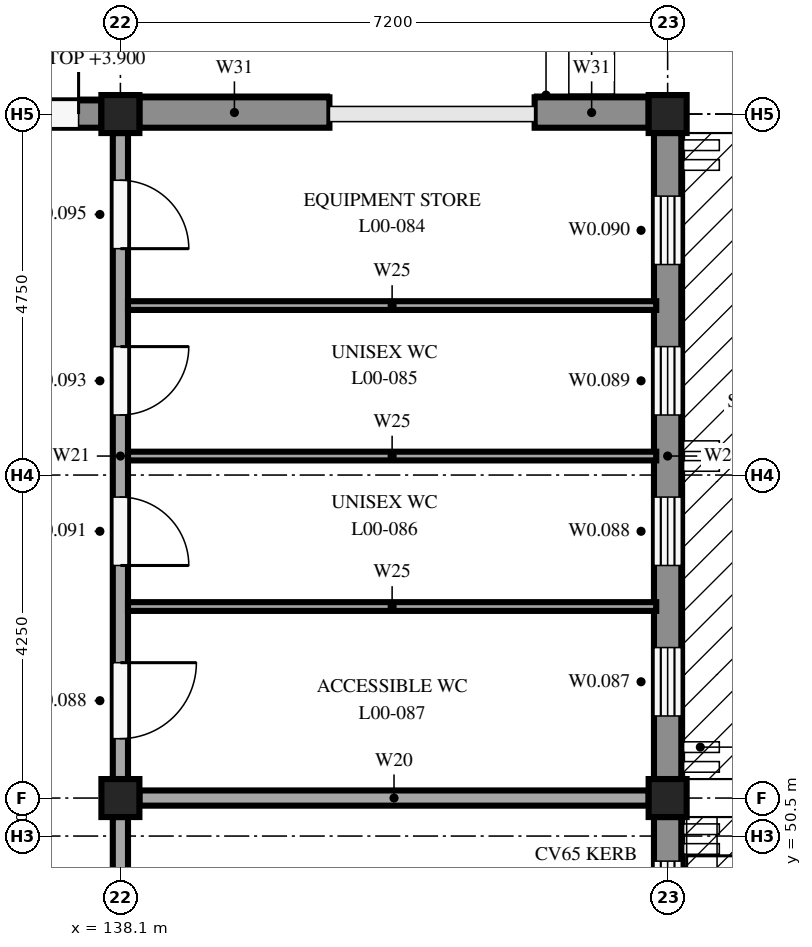
"""IFC4 building model, lengths in metres.
Left out: names, types, materials, properties, quantities, classifications, styles, units other than length and angle.
Written with IfcOpenShell. Run it as: python <this file> out.ifc"""

import sys

from ifc_helpers import new_model, si_unit, direction, frame, frame_2d, origin, origin_2d, place, context, subcontext, project, spatial, rectangle, extrude, element, fill, save


model = new_model("IFC4")
c1 = context("Model", 3, precision=1e-05, world=origin(), true_north=direction((0.0, 1.0)))
c2 = subcontext(c1, "Body", "Model", "MODEL_VIEW")
j1 = project(units=[si_unit("LENGTHUNIT", "METRE"), si_unit("PLANEANGLEUNIT", "RADIAN")], contexts=[c1])
p1 = place(None, origin())
s1 = spatial("IfcSite", under=j1, at=p1, CompositionType="ELEMENT")
p2 = place(p1, origin())
s2 = spatial("IfcBuilding", under=s1, at=p2, CompositionType="ELEMENT")
p3 = place(p2, origin())
s3 = spatial("IfcBuildingStorey", under=s2, at=p3, CompositionType="ELEMENT", Elevation=0.0)
for number, where, z_axis, x_axis in (
    (1, (138.1, 51.0, 0.0), (0.0, 0.0, 1.0), (1.0, 0.0, 0.0)),
    (2, (138.1, 60.0, 0.0), (0.0, 0.0, 1.0), (1.0, 0.0, 0.0)),
    (3, (145.3, 51.0, 0.0), (0.0, 0.0, 1.0), (1.0, 0.0, 0.0)),
    (4, (145.3, 60.0, 0.0), (0.0, 0.0, 1.0), (1.0, 0.0, 0.0)),
):
    element("IfcColumn", number, at=place(p3, frame(where, z_axis=z_axis, x_axis=x_axis)), inside=s3, PredefinedType="COLUMN", context=c2, shape_type="SweptSolid", body=[
        extrude(rectangle(XDim=0.5, YDim=0.5, at=origin_2d()), origin(), (0.0, 0.0, 1.0), 4.25),
    ])
p4 = place(p3, frame((145.3, 50.75, 0.0), z_axis=(0.0, 0.0, 1.0), x_axis=(0.0, -1.0, 0.0)))
e5 = element("IfcWall", 5, at=p4, inside=s3, PredefinedType="STANDARD", context=c2, shape_type="SweptSolid", body=[
    extrude(rectangle(XDim=8.5, YDim=0.36, at=frame_2d((4.25, 0.0))), origin(), (0.0, 0.0, 1.0), 3.75),
])
p5 = place(p4, frame((6.52, 0.0, 0.6)))
e6 = element("IfcOpeningElement", 6, at=p5, cuts=e5, PredefinedType="OPENING", context=c2, shape_type="SweptSolid", body=[
    extrude(rectangle(XDim=1.4, YDim=3.0, at=frame_2d((0.7, 1.5))), frame((0.0, 0.19, 0.0), z_axis=(0.0, -1.0, 0.0), x_axis=(1.0, 0.0, 0.0)), (0.0, 0.0, 1.0), 0.38),
])
p6 = place(p4, frame((4.54, 0.0, 0.6)))
e7 = element("IfcOpeningElement", 7, at=p6, cuts=e5, PredefinedType="OPENING", context=c2, shape_type="SweptSolid", body=[
    extrude(rectangle(XDim=1.4, YDim=3.0, at=frame_2d((0.7, 1.5))), frame((0.0, 0.19, 0.0), z_axis=(0.0, -1.0, 0.0), x_axis=(1.0, 0.0, 0.0)), (0.0, 0.0, 1.0), 0.38),
])
p7 = place(p4, frame((2.56, 0.0, 0.6)))
e8 = element("IfcOpeningElement", 8, at=p7, cuts=e5, PredefinedType="OPENING", context=c2, shape_type="SweptSolid", body=[
    extrude(rectangle(XDim=1.4, YDim=3.0, at=frame_2d((0.7, 1.5))), frame((0.0, 0.19, 0.0), z_axis=(0.0, -1.0, 0.0), x_axis=(1.0, 0.0, 0.0)), (0.0, 0.0, 1.0), 0.38),
])
p8 = place(p4, frame((0.58, 0.0, 0.6)))
e9 = element("IfcOpeningElement", 9, at=p8, cuts=e5, PredefinedType="OPENING", context=c2, shape_type="SweptSolid", body=[
    extrude(rectangle(XDim=1.4, YDim=3.0, at=frame_2d((0.7, 1.5))), frame((0.0, 0.19, 0.0), z_axis=(0.0, -1.0, 0.0), x_axis=(1.0, 0.0, 0.0)), (0.0, 0.0, 1.0), 0.38),
])
p9 = place(p3, frame((145.3, 59.75, 0.0), z_axis=(0.0, 0.0, 1.0), x_axis=(0.0, -1.0, 0.0)))
e10 = element("IfcWall", 10, at=p9, inside=s3, PredefinedType="STANDARD", context=c2, shape_type="SweptSolid", body=[
    extrude(rectangle(XDim=8.5, YDim=0.36, at=frame_2d((4.25, 0.0))), origin(), (0.0, 0.0, 1.0), 3.75),
])
p10 = place(p9, frame((6.77, 0.0, 1.6)))
e11 = element("IfcOpeningElement", 11, at=p10, cuts=e10, PredefinedType="OPENING", context=c2, shape_type="SweptSolid", body=[
    extrude(rectangle(XDim=0.9, YDim=1.0, at=frame_2d((0.45, 0.5))), frame((0.0, 0.19, 0.0), z_axis=(0.0, -1.0, 0.0), x_axis=(1.0, 0.0, 0.0)), (0.0, 0.0, 1.0), 0.38),
])
p11 = place(p9, frame((4.79, 0.0, 1.6)))
e12 = element("IfcOpeningElement", 12, at=p11, cuts=e10, PredefinedType="OPENING", context=c2, shape_type="SweptSolid", body=[
    extrude(rectangle(XDim=0.9, YDim=1.0, at=frame_2d((0.45, 0.5))), frame((0.0, 0.19, 0.0), z_axis=(0.0, -1.0, 0.0), x_axis=(1.0, 0.0, 0.0)), (0.0, 0.0, 1.0), 0.38),
])
p12 = place(p9, frame((2.81, 0.0, 1.6)))
e13 = element("IfcOpeningElement", 13, at=p12, cuts=e10, PredefinedType="OPENING", context=c2, shape_type="SweptSolid", body=[
    extrude(rectangle(XDim=0.9, YDim=1.0, at=frame_2d((0.45, 0.5))), frame((0.0, 0.19, 0.0), z_axis=(0.0, -1.0, 0.0), x_axis=(1.0, 0.0, 0.0)), (0.0, 0.0, 1.0), 0.38),
])
p13 = place(p9, frame((0.83, 0.0, 1.6)))
e14 = element("IfcOpeningElement", 14, at=p13, cuts=e10, PredefinedType="OPENING", context=c2, shape_type="SweptSolid", body=[
    extrude(rectangle(XDim=0.9, YDim=1.0, at=frame_2d((0.45, 0.5))), frame((0.0, 0.19, 0.0), z_axis=(0.0, -1.0, 0.0), x_axis=(1.0, 0.0, 0.0)), (0.0, 0.0, 1.0), 0.38),
])
p14 = place(p3, frame((135.65, 60.0, 0.0), z_axis=(0.0, 0.0, 1.0), x_axis=(1.0, 0.0, 0.0)))
e15 = element("IfcWall", 15, at=p14, inside=s3, PredefinedType="STANDARD", context=c2, shape_type="SweptSolid", body=[
    extrude(rectangle(XDim=2.2, YDim=0.36, at=frame_2d((1.1, 0.0))), origin(), (0.0, 0.0, 1.0), 3.9),
])
p15 = place(p14, frame((0.3, 0.0, 0.0)))
e16 = element("IfcOpeningElement", 16, at=p15, cuts=e15, PredefinedType="OPENING", context=c2, shape_type="SweptSolid", body=[
    extrude(rectangle(XDim=1.6, YDim=2.1, at=frame_2d((0.8, 1.05))), frame((0.0, 0.19, 0.0), z_axis=(0.0, -1.0, 0.0), x_axis=(1.0, 0.0, 0.0)), (0.0, 0.0, 1.0), 0.38),
])
p16 = place(p3, frame((138.35, 60.02, 0.0), z_axis=(0.0, 0.0, 1.0), x_axis=(1.0, 0.0, 0.0)))
e17 = element("IfcWall", 17, at=p16, inside=s3, PredefinedType="STANDARD", context=c2, shape_type="SweptSolid", body=[
    extrude(rectangle(XDim=2.5, YDim=0.4, at=frame_2d((1.25, 0.0))), origin(), (0.0, 0.0, 1.0), 3.8),
])
p17 = place(p3, frame((143.55, 60.02, 0.0), z_axis=(0.0, 0.0, 1.0), x_axis=(1.0, 0.0, 0.0)))
e18 = element("IfcWall", 18, at=p17, inside=s3, PredefinedType="STANDARD", context=c2, shape_type="SweptSolid", body=[
    extrude(rectangle(XDim=1.5, YDim=0.4, at=frame_2d((0.75, 0.0))), origin(), (0.0, 0.0, 1.0), 3.8),
])
p18 = place(p3, frame((138.1, 59.75, 0.0), z_axis=(0.0, 0.0, 1.0), x_axis=(0.0, -1.0, 0.0)))
e19 = element("IfcWall", 19, at=p18, inside=s3, PredefinedType="PARTITIONING", context=c2, shape_type="SweptSolid", body=[
    extrude(rectangle(XDim=8.5, YDim=0.2, at=frame_2d((4.25, 0.0))), origin(), (0.0, 0.0, 1.0), 3.8),
])
p19 = place(p18, frame((6.969, 0.0, 0.0)))
e20 = element("IfcOpeningElement", 20, at=p19, cuts=e19, PredefinedType="OPENING", context=c2, shape_type="SweptSolid", body=[
    extrude(rectangle(XDim=1.0, YDim=2.1, at=frame_2d((0.5, 1.05))), frame((0.0, 0.11, 0.0), z_axis=(0.0, -1.0, 0.0), x_axis=(1.0, 0.0, 0.0)), (0.0, 0.0, 1.0), 0.22),
])
p20 = place(p18, frame((4.79, 0.0, 0.0)))
e21 = element("IfcOpeningElement", 21, at=p20, cuts=e19, PredefinedType="OPENING", context=c2, shape_type="SweptSolid", body=[
    extrude(rectangle(XDim=0.9, YDim=2.1, at=frame_2d((0.45, 1.05))), frame((0.0, 0.11, 0.0), z_axis=(0.0, -1.0, 0.0), x_axis=(1.0, 0.0, 0.0)), (0.0, 0.0, 1.0), 0.22),
])
p21 = place(p18, frame((2.81, 0.0, 0.0)))
e22 = element("IfcOpeningElement", 22, at=p21, cuts=e19, PredefinedType="OPENING", context=c2, shape_type="SweptSolid", body=[
    extrude(rectangle(XDim=0.9, YDim=2.1, at=frame_2d((0.45, 1.05))), frame((0.0, 0.11, 0.0), z_axis=(0.0, -1.0, 0.0), x_axis=(1.0, 0.0, 0.0)), (0.0, 0.0, 1.0), 0.22),
])
p22 = place(p18, frame((0.621, 0.0, 0.0)))
e23 = element("IfcOpeningElement", 23, at=p22, cuts=e19, PredefinedType="OPENING", context=c2, shape_type="SweptSolid", body=[
    extrude(rectangle(XDim=0.9, YDim=2.1, at=frame_2d((0.45, 1.05))), frame((0.0, 0.11, 0.0), z_axis=(0.0, -1.0, 0.0), x_axis=(1.0, 0.0, 0.0)), (0.0, 0.0, 1.0), 0.22),
])
p23 = place(p3, frame((138.35, 51.0, 0.0), z_axis=(0.0, 0.0, 1.0), x_axis=(1.0, 0.0, 0.0)))
e24 = element("IfcWall", 24, at=p23, inside=s3, PredefinedType="PARTITIONING", context=c2, shape_type="SweptSolid", body=[
    extrude(rectangle(XDim=6.7, YDim=0.2, at=frame_2d((3.35, 0.0))), origin(), (0.0, 0.0, 1.0), 3.8),
])
for number, where, z_axis, x_axis in (
    (25, (138.2, 57.48, 0.0), (0.0, 0.0, 1.0), (1.0, 0.0, 0.0)),
    (26, (138.2, 55.5, 0.0), (0.0, 0.0, 1.0), (1.0, 0.0, 0.0)),
    (27, (138.2, 53.52, 0.0), (0.0, 0.0, 1.0), (1.0, 0.0, 0.0)),
):
    element("IfcWall", number, at=place(p3, frame(where, z_axis=z_axis, x_axis=x_axis)), inside=s3, PredefinedType="PARTITIONING", context=c2, shape_type="SweptSolid", body=[
        extrude(rectangle(XDim=6.95, YDim=0.115, at=frame_2d((3.475, 0.0))), origin(), (0.0, 0.0, 1.0), 4.25),
    ])
p24 = place(p3, frame((138.1, 50.75, 0.0), z_axis=(0.0, 0.0, 1.0), x_axis=(0.0, -1.0, 0.0)))
e28 = element("IfcWall", 28, at=p24, inside=s3, PredefinedType="PARTITIONING", context=c2, shape_type="SweptSolid", body=[
    extrude(rectangle(XDim=8.5, YDim=0.2, at=frame_2d((4.25, 0.0))), origin(), (0.0, 0.0, 1.0), 3.8),
])
p25 = place(p24, frame((3.75, 0.0, 0.0)))
e29 = element("IfcOpeningElement", 29, at=p25, cuts=e28, PredefinedType="OPENING", context=c2, shape_type="SweptSolid", body=[
    extrude(rectangle(XDim=1.0, YDim=2.1, at=frame_2d((0.5, 1.05))), frame((0.0, 0.11, 0.0), z_axis=(0.0, -1.0, 0.0), x_axis=(1.0, 0.0, 0.0)), (0.0, 0.0, 1.0), 0.22),
])
p26 = place(p8, origin())
e30 = element("IfcWindow", 30, at=p26, inside=s3, PartitioningType="DOUBLE_PANEL_VERTICAL", PredefinedType="WINDOW", context=c2, shape_type="SweptSolid", body=[
    extrude(rectangle(XDim=1.4, YDim=3.0, at=frame_2d((0.7, 1.5))), frame((0.0, 0.03, 0.0), z_axis=(0.0, -1.0, 0.0), x_axis=(1.0, 0.0, 0.0)), (0.0, 0.0, 1.0), 0.06),
])
fill(e9, e30)
p27 = place(p10, origin())
e31 = element("IfcWindow", 31, at=p27, inside=s3, PartitioningType="SINGLE_PANEL", PredefinedType="WINDOW", context=c2, shape_type="SweptSolid", body=[
    extrude(rectangle(XDim=0.9, YDim=1.0, at=frame_2d((0.45, 0.5))), frame((0.0, 0.03, 0.0), z_axis=(0.0, -1.0, 0.0), x_axis=(1.0, 0.0, 0.0)), (0.0, 0.0, 1.0), 0.06),
])
fill(e11, e31)
p28 = place(p11, origin())
e32 = element("IfcWindow", 32, at=p28, inside=s3, PartitioningType="SINGLE_PANEL", PredefinedType="WINDOW", context=c2, shape_type="SweptSolid", body=[
    extrude(rectangle(XDim=0.9, YDim=1.0, at=frame_2d((0.45, 0.5))), frame((0.0, 0.03, 0.0), z_axis=(0.0, -1.0, 0.0), x_axis=(1.0, 0.0, 0.0)), (0.0, 0.0, 1.0), 0.06),
])
fill(e12, e32)
p29 = place(p12, origin())
e33 = element("IfcWindow", 33, at=p29, inside=s3, PartitioningType="SINGLE_PANEL", PredefinedType="WINDOW", context=c2, shape_type="SweptSolid", body=[
    extrude(rectangle(XDim=0.9, YDim=1.0, at=frame_2d((0.45, 0.5))), frame((0.0, 0.03, 0.0), z_axis=(0.0, -1.0, 0.0), x_axis=(1.0, 0.0, 0.0)), (0.0, 0.0, 1.0), 0.06),
])
fill(e13, e33)
p30 = place(p13, origin())
e34 = element("IfcWindow", 34, at=p30, inside=s3, PartitioningType="SINGLE_PANEL", PredefinedType="WINDOW", context=c2, shape_type="SweptSolid", body=[
    extrude(rectangle(XDim=0.9, YDim=1.0, at=frame_2d((0.45, 0.5))), frame((0.0, 0.03, 0.0), z_axis=(0.0, -1.0, 0.0), x_axis=(1.0, 0.0, 0.0)), (0.0, 0.0, 1.0), 0.06),
])
fill(e14, e34)
p31 = place(p15, origin())
e35 = element("IfcDoor", 35, at=p31, inside=s3, OperationType="DOUBLE_DOOR_SINGLE_SWING", PredefinedType="DOOR", context=c2, shape_type="SweptSolid", body=[
    extrude(rectangle(XDim=1.6, YDim=2.1, at=frame_2d((0.8, 1.05))), frame((0.0, 0.025, 0.0), z_axis=(0.0, -1.0, 0.0), x_axis=(1.0, 0.0, 0.0)), (0.0, 0.0, 1.0), 0.05),
])
fill(e16, e35)
p32 = place(p19, origin())
e36 = element("IfcDoor", 36, at=p32, inside=s3, OperationType="SINGLE_SWING_LEFT", PredefinedType="DOOR", context=c2, shape_type="SweptSolid", body=[
    extrude(rectangle(XDim=1.0, YDim=2.1, at=frame_2d((0.5, 1.05))), frame((0.0, 0.025, 0.0), z_axis=(0.0, -1.0, 0.0), x_axis=(1.0, 0.0, 0.0)), (0.0, 0.0, 1.0), 0.05),
])
fill(e20, e36)
p33 = place(p20, origin())
e37 = element("IfcDoor", 37, at=p33, inside=s3, OperationType="SINGLE_SWING_RIGHT", PredefinedType="DOOR", context=c2, shape_type="SweptSolid", body=[
    extrude(rectangle(XDim=0.9, YDim=2.1, at=frame_2d((0.45, 1.05))), frame((0.0, 0.025, 0.0), z_axis=(0.0, -1.0, 0.0), x_axis=(1.0, 0.0, 0.0)), (0.0, 0.0, 1.0), 0.05),
])
fill(e21, e37)
p34 = place(p21, origin())
e38 = element("IfcDoor", 38, at=p34, inside=s3, OperationType="SINGLE_SWING_LEFT", PredefinedType="DOOR", context=c2, shape_type="SweptSolid", body=[
    extrude(rectangle(XDim=0.9, YDim=2.1, at=frame_2d((0.45, 1.05))), frame((0.0, 0.025, 0.0), z_axis=(0.0, -1.0, 0.0), x_axis=(1.0, 0.0, 0.0)), (0.0, 0.0, 1.0), 0.05),
])
fill(e22, e38)
p35 = place(p22, origin())
e39 = element("IfcDoor", 39, at=p35, inside=s3, OperationType="SINGLE_SWING_RIGHT", PredefinedType="DOOR", context=c2, shape_type="SweptSolid", body=[
    extrude(rectangle(XDim=0.9, YDim=2.1, at=frame_2d((0.45, 1.05))), frame((0.0, 0.025, 0.0), z_axis=(0.0, -1.0, 0.0), x_axis=(1.0, 0.0, 0.0)), (0.0, 0.0, 1.0), 0.05),
])
fill(e23, e39)
save(model, sys.argv[1])
